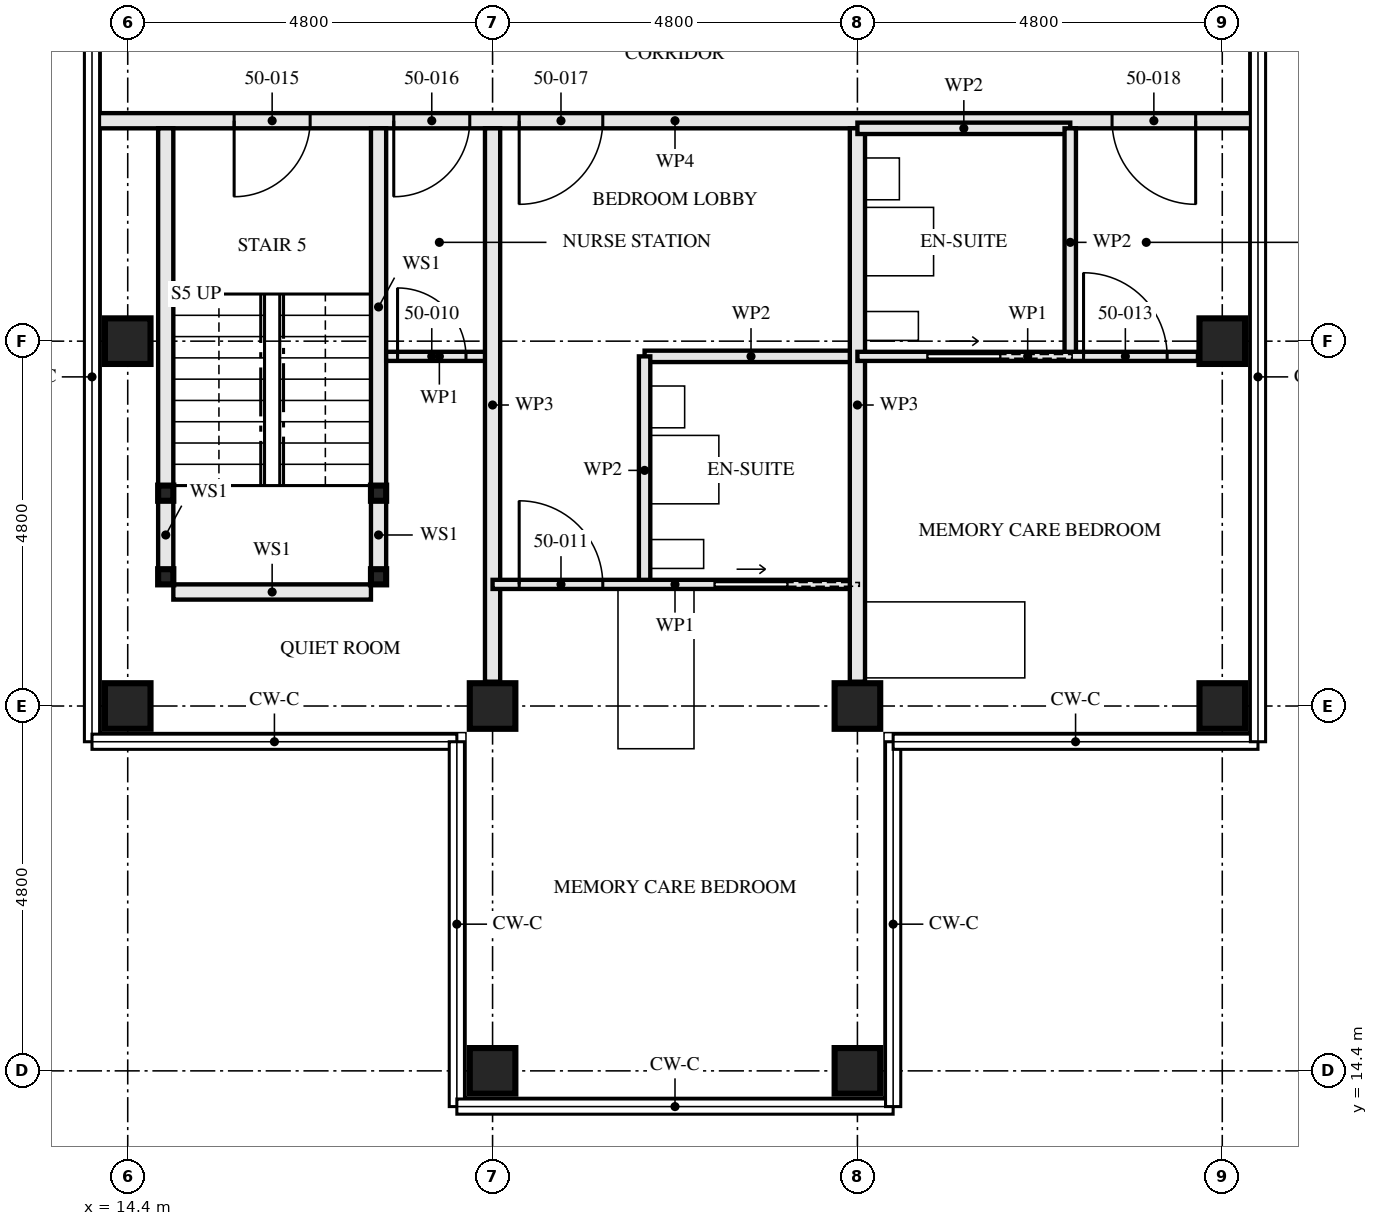
"""IFC4 building model, lengths in metres.
Left out: names, types, materials, properties, quantities, classifications, styles, units other than length and angle.
Written with IfcOpenShell. Run it as: python <this file> out.ifc"""

import sys

from ifc_helpers import new_model, si_unit, direction, frame, frame_2d, origin, origin_2d, place, context, subcontext, project, spatial, rectangle, hollow_rectangle, extrude, element, fill, save


model = new_model("IFC4")
c1 = context("Model", 3, precision=1e-05, world=origin(), true_north=direction((0.0, 1.0)))
c2 = subcontext(c1, "Body", "Model", "MODEL_VIEW")
j1 = project(units=[si_unit("LENGTHUNIT", "METRE"), si_unit("PLANEANGLEUNIT", "RADIAN")], contexts=[c1])
p1 = place(None, origin())
s1 = spatial("IfcSite", under=j1, at=p1, CompositionType="ELEMENT")
p2 = place(p1, origin())
s2 = spatial("IfcBuilding", under=s1, at=p2, CompositionType="ELEMENT")
p3 = place(p2, frame((0.0, 0.0, 183.0)))
s3 = spatial("IfcBuildingStorey", under=s2, at=p3, CompositionType="ELEMENT", Elevation=183.0)
for number, where, z_axis, x_axis in (
    (1, (14.4, 19.2, 0.0), (0.0, 0.0, 1.0), (0.0, 1.0, 0.0)),
    (2, (14.4, 24.0, 0.0), (0.0, 0.0, 1.0), (1.0, 0.0, 0.0)),
    (3, (19.2, 14.4, 0.0), (0.0, 0.0, 1.0), (0.0, 1.0, 0.0)),
    (4, (19.2, 19.2, 0.0), (0.0, 0.0, 1.0), (0.0, 1.0, 0.0)),
    (5, (24.0, 14.4, 0.0), (0.0, 0.0, 1.0), (0.0, 1.0, 0.0)),
    (6, (24.0, 19.2, 0.0), (0.0, 0.0, 1.0), (0.0, 1.0, 0.0)),
    (7, (28.8, 19.2, 0.0), (0.0, 0.0, 1.0), (0.0, 1.0, 0.0)),
    (8, (28.8, 24.0, 0.0), (0.0, 0.0, 1.0), (1.0, 0.0, 0.0)),
):
    element("IfcColumn", number, at=place(p3, frame(where, z_axis=z_axis, x_axis=x_axis)), inside=s3, PredefinedType="COLUMN", context=c2, shape_type="SweptSolid", body=[
        extrude(hollow_rectangle(XDim=0.6, YDim=0.6, WallThickness=0.08, at=origin_2d()), origin(), (0.0, 0.0, 1.0), 3.5),
    ])
for number, where, z_axis, x_axis in (
    (9, (14.9, 20.9, 0.0), (0.0, 0.0, 1.0), (1.0, 0.0, 0.0)),
    (10, (17.7, 20.9, 0.0), (0.0, 0.0, 1.0), (1.0, 0.0, 0.0)),
    (11, (14.9, 22.0, 0.0), (0.0, 0.0, 1.0), (1.0, 0.0, 0.0)),
    (12, (17.7, 22.0, 0.0), (0.0, 0.0, 1.0), (1.0, 0.0, 0.0)),
):
    element("IfcColumn", number, at=place(p3, frame(where, z_axis=z_axis, x_axis=x_axis)), inside=s3, PredefinedType="COLUMN", context=c2, shape_type="SweptSolid", body=[
        extrude(hollow_rectangle(XDim=0.2, YDim=0.2, WallThickness=0.008, at=origin_2d()), origin(), (0.0, 0.0, 1.0), 3.33),
    ])
p4 = place(p3, frame((14.9, 21.0, 0.0), z_axis=(0.0, 0.0, 1.0), x_axis=(0.0, 1.0, 0.0)))
e13 = element("IfcWall", 13, at=p4, inside=s3, PredefinedType="SOLIDWALL", context=c2, shape_type="SweptSolid", body=[
    extrude(rectangle(XDim=0.9, YDim=0.2, at=frame_2d((0.45, 0.0))), origin(), (0.0, 0.0, 1.0), 2.99),
])
p5 = place(p3, frame((14.9, 22.1, 0.0), z_axis=(0.0, 0.0, 1.0), x_axis=(0.0, 1.0, 0.0)))
e14 = element("IfcWall", 14, at=p5, inside=s3, PredefinedType="SOLIDWALL", context=c2, shape_type="SweptSolid", body=[
    extrude(rectangle(XDim=4.7, YDim=0.2, at=frame_2d((2.35, 0.0))), origin(), (0.0, 0.0, 1.0), 2.99),
])
p6 = place(p3, frame((17.7, 21.0, 0.0), z_axis=(0.0, 0.0, 1.0), x_axis=(0.0, 1.0, 0.0)))
e15 = element("IfcWall", 15, at=p6, inside=s3, PredefinedType="SOLIDWALL", context=c2, shape_type="SweptSolid", body=[
    extrude(rectangle(XDim=0.9, YDim=0.2, at=frame_2d((0.45, 0.0))), origin(), (0.0, 0.0, 1.0), 2.99),
])
p7 = place(p3, frame((17.7, 22.1, 0.0), z_axis=(0.0, 0.0, 1.0), x_axis=(0.0, 1.0, 0.0)))
e16 = element("IfcWall", 16, at=p7, inside=s3, PredefinedType="SOLIDWALL", context=c2, shape_type="SweptSolid", body=[
    extrude(rectangle(XDim=4.7, YDim=0.2, at=frame_2d((2.35, 0.0))), origin(), (0.0, 0.0, 1.0), 2.99),
])
p8 = place(p3, frame((15.0, 20.7, 0.0), z_axis=(0.0, 0.0, 1.0), x_axis=(1.0, 0.0, 0.0)))
e17 = element("IfcWall", 17, at=p8, inside=s3, PredefinedType="SOLIDWALL", context=c2, shape_type="SweptSolid", body=[
    extrude(rectangle(XDim=2.6, YDim=0.2, at=frame_2d((1.3, 0.0))), origin(), (0.0, 0.0, 1.0), 3.33),
])
p9 = place(p3, frame((17.8, 23.8, 0.0), z_axis=(0.0, 0.0, 1.0), x_axis=(1.0, 0.0, 0.0)))
e18 = element("IfcWall", 18, at=p9, inside=s3, PredefinedType="PARTITIONING", context=c2, shape_type="SweptSolid", body=[
    extrude(rectangle(XDim=1.4, YDim=0.12, at=frame_2d((0.7, 0.0))), origin(), (0.0, 0.0, 1.0), 3.33),
])
p10 = place(p9, frame((0.15, 0.0, 0.0)))
e19 = element("IfcOpeningElement", 19, at=p10, cuts=e18, PredefinedType="OPENING", context=c2, shape_type="SweptSolid", body=[
    extrude(rectangle(XDim=0.9, YDim=2.1, at=frame_2d((0.45, 1.05))), frame((0.0, 0.071, 0.0), z_axis=(0.0, -1.0, 0.0), x_axis=(1.0, 0.0, 0.0)), (0.0, 0.0, 1.0), 0.141),
])
p11 = place(p3, frame((19.2, 19.52, 0.0), z_axis=(0.0, 0.0, 1.0), x_axis=(0.0, 1.0, 0.0)))
e20 = element("IfcWall", 20, at=p11, inside=s3, PredefinedType="PARTITIONING", context=c2, shape_type="SweptSolid", body=[
    extrude(rectangle(XDim=7.28, YDim=0.2, at=frame_2d((3.64, 0.0))), origin(), (0.0, 0.0, 1.0), 2.55),
])
p12 = place(p3, frame((21.2, 20.8, 0.0), z_axis=(0.0, 0.0, 1.0), x_axis=(0.0, 1.0, 0.0)))
e21 = element("IfcWall", 21, at=p12, inside=s3, PredefinedType="PARTITIONING", context=c2, shape_type="SweptSolid", body=[
    extrude(rectangle(XDim=3.0, YDim=0.15, at=frame_2d((1.5, 0.0))), origin(), (0.0, 0.0, 1.0), 3.33),
])
p13 = place(p3, frame((21.2, 23.8, 0.0), z_axis=(0.0, 0.0, 1.0), x_axis=(1.0, 0.0, 0.0)))
e22 = element("IfcWall", 22, at=p13, inside=s3, PredefinedType="PARTITIONING", context=c2, shape_type="SweptSolid", body=[
    extrude(rectangle(XDim=2.8, YDim=0.15, at=frame_2d((1.4, 0.0))), origin(), (0.0, 0.0, 1.0), 3.33),
])
p14 = place(p3, frame((19.2, 20.8, 0.0), z_axis=(0.0, 0.0, 1.0), x_axis=(1.0, 0.0, 0.0)))
e23 = element("IfcWall", 23, at=p14, inside=s3, PredefinedType="PARTITIONING", context=c2, shape_type="SweptSolid", body=[
    extrude(rectangle(XDim=4.8, YDim=0.12, at=frame_2d((2.4, 0.0))), origin(), (0.0, 0.0, 1.0), 3.33),
])
p15 = place(p14, frame((0.35, 0.0, 0.0)))
e24 = element("IfcOpeningElement", 24, at=p15, cuts=e23, PredefinedType="OPENING", context=c2, shape_type="SweptSolid", body=[
    extrude(rectangle(XDim=1.1, YDim=2.1, at=frame_2d((0.55, 1.05))), frame((0.0, 0.071, 0.0), z_axis=(0.0, -1.0, 0.0), x_axis=(1.0, 0.0, 0.0)), (0.0, 0.0, 1.0), 0.141),
])
p16 = place(p14, frame((2.925, 0.0, 0.0)))
e25 = element("IfcOpeningElement", 25, at=p16, cuts=e23, PredefinedType="OPENING", context=c2, shape_type="SweptSolid", body=[
    extrude(rectangle(XDim=0.95, YDim=2.1, at=frame_2d((0.475, 1.05))), frame((0.0, 0.071, 0.0), z_axis=(0.0, -1.0, 0.0), x_axis=(1.0, 0.0, 0.0)), (0.0, 0.0, 1.0), 0.141),
])
p17 = place(p3, frame((24.0, 19.52, 0.0), z_axis=(0.0, 0.0, 1.0), x_axis=(0.0, 1.0, 0.0)))
e26 = element("IfcWall", 26, at=p17, inside=s3, PredefinedType="PARTITIONING", context=c2, shape_type="SweptSolid", body=[
    extrude(rectangle(XDim=7.28, YDim=0.2, at=frame_2d((3.64, 0.0))), origin(), (0.0, 0.0, 1.0), 2.55),
])
p18 = place(p3, frame((26.8, 23.8, 0.0), z_axis=(0.0, 0.0, 1.0), x_axis=(0.0, 1.0, 0.0)))
e27 = element("IfcWall", 27, at=p18, inside=s3, PredefinedType="PARTITIONING", context=c2, shape_type="SweptSolid", body=[
    extrude(rectangle(XDim=3.0, YDim=0.15, at=frame_2d((1.5, 0.0))), origin(), (0.0, 0.0, 1.0), 2.55),
])
p19 = place(p3, frame((24.0, 26.8, 0.0), z_axis=(0.0, 0.0, 1.0), x_axis=(1.0, 0.0, 0.0)))
e28 = element("IfcWall", 28, at=p19, inside=s3, PredefinedType="PARTITIONING", context=c2, shape_type="SweptSolid", body=[
    extrude(rectangle(XDim=2.8, YDim=0.15, at=frame_2d((1.4, 0.0))), origin(), (0.0, 0.0, 1.0), 3.33),
])
p20 = place(p3, frame((24.0, 23.8, 0.0), z_axis=(0.0, 0.0, 1.0), x_axis=(1.0, 0.0, 0.0)))
e29 = element("IfcWall", 29, at=p20, inside=s3, PredefinedType="PARTITIONING", context=c2, shape_type="SweptSolid", body=[
    extrude(rectangle(XDim=4.48, YDim=0.12, at=frame_2d((2.24, 0.0))), origin(), (0.0, 0.0, 1.0), 3.33),
])
p21 = place(p20, frame((2.975, 0.0, 0.0)))
e30 = element("IfcOpeningElement", 30, at=p21, cuts=e29, PredefinedType="OPENING", context=c2, shape_type="SweptSolid", body=[
    extrude(rectangle(XDim=1.1, YDim=2.1, at=frame_2d((0.55, 1.05))), frame((0.0, 0.071, 0.0), z_axis=(0.0, -1.0, 0.0), x_axis=(1.0, 0.0, 0.0)), (0.0, 0.0, 1.0), 0.141),
])
p22 = place(p20, frame((0.925, 0.0, 0.0)))
e31 = element("IfcOpeningElement", 31, at=p22, cuts=e29, PredefinedType="OPENING", context=c2, shape_type="SweptSolid", body=[
    extrude(rectangle(XDim=0.95, YDim=2.1, at=frame_2d((0.475, 1.05))), frame((0.0, 0.071, 0.0), z_axis=(0.0, -1.0, 0.0), x_axis=(1.0, 0.0, 0.0)), (0.0, 0.0, 1.0), 0.141),
])
p23 = place(p3, frame((13.95, 26.9, 0.0), z_axis=(0.0, 0.0, 1.0), x_axis=(1.0, 0.0, 0.0)))
e32 = element("IfcWall", 32, at=p23, inside=s3, PredefinedType="PARTITIONING", context=c2, shape_type="SweptSolid", body=[
    extrude(rectangle(XDim=15.3, YDim=0.2, at=frame_2d((7.65, 0.0))), origin(), (0.0, 0.0, 1.0), 2.32),
])
p24 = place(p23, frame((1.85, 0.0, 0.0)))
e33 = element("IfcOpeningElement", 33, at=p24, cuts=e32, PredefinedType="OPENING", context=c2, shape_type="SweptSolid", body=[
    extrude(rectangle(XDim=1.0, YDim=2.1, at=frame_2d((0.5, 1.05))), frame((0.0, 0.111, 0.0), z_axis=(0.0, -1.0, 0.0), x_axis=(1.0, 0.0, 0.0)), (0.0, 0.0, 1.0), 0.221),
])
p25 = place(p23, frame((3.95, 0.0, 0.0)))
e34 = element("IfcOpeningElement", 34, at=p25, cuts=e32, PredefinedType="OPENING", context=c2, shape_type="SweptSolid", body=[
    extrude(rectangle(XDim=1.0, YDim=2.1, at=frame_2d((0.5, 1.05))), frame((0.0, 0.111, 0.0), z_axis=(0.0, -1.0, 0.0), x_axis=(1.0, 0.0, 0.0)), (0.0, 0.0, 1.0), 0.221),
])
p26 = place(p23, frame((5.6, 0.0, 0.0)))
e35 = element("IfcOpeningElement", 35, at=p26, cuts=e32, PredefinedType="OPENING", context=c2, shape_type="SweptSolid", body=[
    extrude(rectangle(XDim=1.1, YDim=2.1, at=frame_2d((0.55, 1.05))), frame((0.0, 0.111, 0.0), z_axis=(0.0, -1.0, 0.0), x_axis=(1.0, 0.0, 0.0)), (0.0, 0.0, 1.0), 0.221),
])
p27 = place(p23, frame((13.4, 0.0, 0.0)))
e36 = element("IfcOpeningElement", 36, at=p27, cuts=e32, PredefinedType="OPENING", context=c2, shape_type="SweptSolid", body=[
    extrude(rectangle(XDim=1.1, YDim=2.1, at=frame_2d((0.55, 1.05))), frame((0.0, 0.111, 0.0), z_axis=(0.0, -1.0, 0.0), x_axis=(1.0, 0.0, 0.0)), (0.0, 0.0, 1.0), 0.221),
])
p28 = place(p10, origin())
e37 = element("IfcDoor", 37, at=p28, inside=s3, OperationType="SINGLE_SWING_RIGHT", PredefinedType="DOOR", context=c2, shape_type="SweptSolid", body=[
    extrude(rectangle(XDim=0.9, YDim=2.1, at=frame_2d((0.45, 1.05))), frame((0.0, 0.022, 0.0), z_axis=(0.0, -1.0, 0.0), x_axis=(1.0, 0.0, 0.0)), (0.0, 0.0, 1.0), 0.044),
])
fill(e19, e37)
p29 = place(p15, origin())
e38 = element("IfcDoor", 38, at=p29, inside=s3, OperationType="SINGLE_SWING_RIGHT", PredefinedType="DOOR", context=c2, shape_type="SweptSolid", body=[
    extrude(rectangle(XDim=1.1, YDim=2.1, at=frame_2d((0.55, 1.05))), frame((0.0, 0.022, 0.0), z_axis=(0.0, -1.0, 0.0), x_axis=(1.0, 0.0, 0.0)), (0.0, 0.0, 1.0), 0.044),
])
fill(e24, e38)
p30 = place(p16, origin())
e39 = element("IfcDoor", 39, at=p30, inside=s3, OperationType="SLIDING_TO_LEFT", PredefinedType="DOOR", context=c2, shape_type="SweptSolid", body=[
    extrude(rectangle(XDim=0.95, YDim=2.1, at=frame_2d((0.475, 1.05))), frame((0.0, 0.022, 0.0), z_axis=(0.0, -1.0, 0.0), x_axis=(1.0, 0.0, 0.0)), (0.0, 0.0, 1.0), 0.044),
])
fill(e25, e39)
p31 = place(p21, origin())
e40 = element("IfcDoor", 40, at=p31, inside=s3, OperationType="SINGLE_SWING_RIGHT", PredefinedType="DOOR", context=c2, shape_type="SweptSolid", body=[
    extrude(rectangle(XDim=1.1, YDim=2.1, at=frame_2d((0.55, 1.05))), frame((0.0, 0.022, 0.0), z_axis=(0.0, -1.0, 0.0), x_axis=(1.0, 0.0, 0.0)), (0.0, 0.0, 1.0), 0.044),
])
fill(e30, e40)
p32 = place(p22, origin())
e41 = element("IfcDoor", 41, at=p32, inside=s3, OperationType="SLIDING_TO_LEFT", PredefinedType="DOOR", context=c2, shape_type="SweptSolid", body=[
    extrude(rectangle(XDim=0.95, YDim=2.1, at=frame_2d((0.475, 1.05))), frame((0.0, 0.022, 0.0), z_axis=(0.0, -1.0, 0.0), x_axis=(1.0, 0.0, 0.0)), (0.0, 0.0, 1.0), 0.044),
])
fill(e31, e41)
p33 = place(p24, frame((1.0, 0.0, 0.0), z_axis=(0.0, 0.0, 1.0), x_axis=(-1.0, 0.0, 0.0)))
e42 = element("IfcDoor", 42, at=p33, inside=s3, OperationType="SINGLE_SWING_LEFT", PredefinedType="DOOR", context=c2, shape_type="SweptSolid", body=[
    extrude(rectangle(XDim=1.0, YDim=2.1, at=frame_2d((0.5, 1.05))), frame((0.0, 0.032, 0.0), z_axis=(0.0, -1.0, 0.0), x_axis=(1.0, 0.0, 0.0)), (0.0, 0.0, 1.0), 0.064),
])
fill(e33, e42)
p34 = place(p25, frame((1.0, 0.0, 0.0), z_axis=(0.0, 0.0, 1.0), x_axis=(-1.0, 0.0, 0.0)))
e43 = element("IfcDoor", 43, at=p34, inside=s3, OperationType="SINGLE_SWING_LEFT", PredefinedType="DOOR", context=c2, shape_type="SweptSolid", body=[
    extrude(rectangle(XDim=1.0, YDim=2.1, at=frame_2d((0.5, 1.05))), frame((0.0, 0.027, 0.0), z_axis=(0.0, -1.0, 0.0), x_axis=(1.0, 0.0, 0.0)), (0.0, 0.0, 1.0), 0.054),
])
fill(e34, e43)
p35 = place(p26, frame((1.1, 0.0, 0.0), z_axis=(0.0, 0.0, 1.0), x_axis=(-1.0, 0.0, 0.0)))
e44 = element("IfcDoor", 44, at=p35, inside=s3, OperationType="SINGLE_SWING_LEFT", PredefinedType="DOOR", context=c2, shape_type="SweptSolid", body=[
    extrude(rectangle(XDim=1.1, YDim=2.1, at=frame_2d((0.55, 1.05))), frame((0.0, 0.027, 0.0), z_axis=(0.0, -1.0, 0.0), x_axis=(1.0, 0.0, 0.0)), (0.0, 0.0, 1.0), 0.054),
])
fill(e35, e44)
p36 = place(p27, frame((1.1, 0.0, 0.0), z_axis=(0.0, 0.0, 1.0), x_axis=(-1.0, 0.0, 0.0)))
e45 = element("IfcDoor", 45, at=p36, inside=s3, OperationType="SINGLE_SWING_RIGHT", PredefinedType="DOOR", context=c2, shape_type="SweptSolid", body=[
    extrude(rectangle(XDim=1.1, YDim=2.1, at=frame_2d((0.55, 1.05))), frame((0.0, 0.027, 0.0), z_axis=(0.0, -1.0, 0.0), x_axis=(1.0, 0.0, 0.0)), (0.0, 0.0, 1.0), 0.054),
])
fill(e36, e45)
save(model, sys.argv[1])
